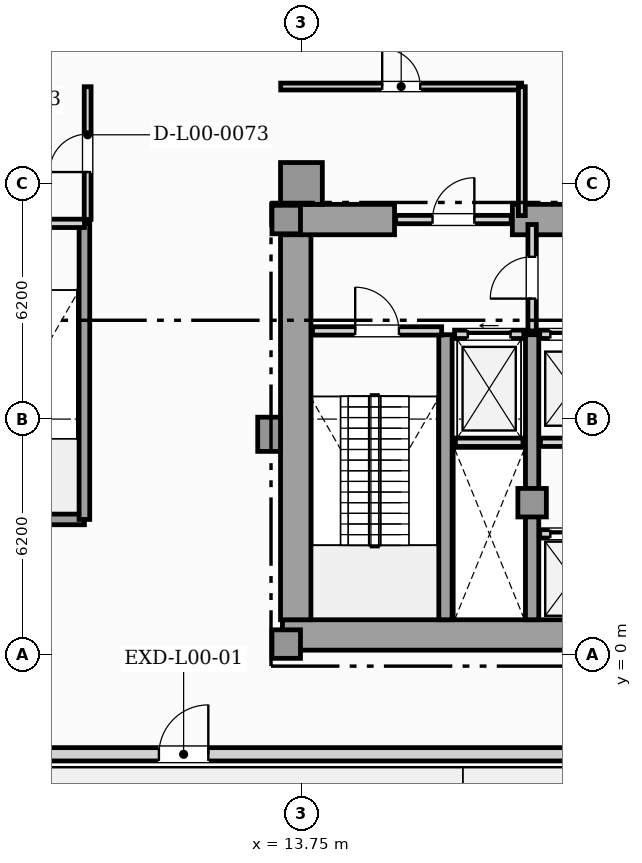
"""IFC4 building model, lengths in metres.
Left out: names, types, materials, properties, quantities, classifications, styles, units other than length and angle.
Written with IfcOpenShell. Run it as: python <this file> out.ifc"""

import sys

from ifc_helpers import new_model, si_unit, direction, frame, frame_2d, origin, origin_2d, place, context, subcontext, project, spatial, rectangle, extrude, element, fill, save


model = new_model("IFC4")
c1 = context("Model", 3, precision=1e-05, world=origin(), true_north=direction((0.0, 1.0)))
c2 = subcontext(c1, "Body", "Model", "MODEL_VIEW")
j1 = project(units=[si_unit("LENGTHUNIT", "METRE"), si_unit("PLANEANGLEUNIT", "RADIAN")], contexts=[c1])
p1 = place(None, origin())
s1 = spatial("IfcSite", under=j1, at=p1, CompositionType="ELEMENT")
p2 = place(p1, origin())
s2 = spatial("IfcBuilding", under=s1, at=p2, CompositionType="ELEMENT")
p3 = place(p2, origin())
s3 = spatial("IfcBuildingStorey", under=s2, at=p3, CompositionType="ELEMENT", Elevation=0.0)
p4 = place(p3, frame((13.25, 0.52, 0.0), z_axis=(0.0, 0.0, 1.0), x_axis=(1.0, 0.0, 0.0)))
e1 = element("IfcWall", 1, at=p4, inside=s3, PredefinedType="SHEAR", context=c2, shape_type="SweptSolid", body=[
    extrude(rectangle(XDim=17.51, YDim=0.8, at=frame_2d((8.755, 0.0))), origin(), (0.0, 0.0, 1.0), 5.1),
])
p5 = place(p3, frame((13.6, 0.92, 0.0), z_axis=(0.0, 0.0, 1.0), x_axis=(0.0, 1.0, 0.0)))
e2 = element("IfcWall", 2, at=p5, inside=s3, PredefinedType="SHEAR", context=c2, shape_type="SweptSolid", body=[
    extrude(rectangle(XDim=10.53, YDim=0.8, at=frame_2d((5.265, 0.0))), origin(), (0.0, 0.0, 1.0), 5.1),
])
p6 = place(p3, frame((13.25, 11.45, 0.0), z_axis=(0.0, 0.0, 1.0), x_axis=(1.0, 0.0, 0.0)))
e3 = element("IfcWall", 3, at=p6, inside=s3, PredefinedType="SHEAR", context=c2, shape_type="SweptSolid", body=[
    extrude(rectangle(XDim=2.95, YDim=0.8, at=frame_2d((1.475, 0.0))), origin(), (0.0, 0.0, 1.0), 5.1),
])
p7 = place(p3, frame((19.3, 11.45, 0.0), z_axis=(0.0, 0.0, 1.0), x_axis=(1.0, 0.0, 0.0)))
e4 = element("IfcWall", 4, at=p7, inside=s3, PredefinedType="SHEAR", context=c2, shape_type="SweptSolid", body=[
    extrude(rectangle(XDim=7.3, YDim=0.8, at=frame_2d((3.65, 0.0))), origin(), (0.0, 0.0, 1.0), 5.1),
])
for number, where, z_axis, x_axis in (
    (5, (17.54, 0.92, 0.0), (0.0, 0.0, 1.0), (0.0, 1.0, 0.0)),
    (6, (19.82, 0.92, 0.0), (0.0, 0.0, 1.0), (0.0, 1.0, 0.0)),
):
    element("IfcWall", number, at=place(p3, frame(where, z_axis=z_axis, x_axis=x_axis)), inside=s3, PredefinedType="SHEAR", context=c2, shape_type="SweptSolid", body=[
        extrude(rectangle(XDim=7.5, YDim=0.35, at=frame_2d((3.75, 0.0))), origin(), (0.0, 0.0, 1.0), 5.1),
    ])
p8 = place(p3, frame((12.9, 5.8, 0.0), z_axis=(0.0, 0.0, 1.0), x_axis=(1.0, 0.0, 0.0)))
e7 = element("IfcColumn", 7, at=p8, inside=s3, PredefinedType="PILASTER", context=c2, shape_type="SweptSolid", body=[
    extrude(rectangle(XDim=0.6, YDim=0.9, at=origin_2d()), origin(), (0.0, 0.0, 1.0), 5.4),
])
for number, where, z_axis, x_axis in (
    (8, (13.35, 0.28, 0.0), (0.0, 0.0, 1.0), (1.0, 0.0, 0.0)),
    (9, (13.35, 11.45, 0.0), (0.0, 0.0, 1.0), (1.0, 0.0, 0.0)),
    (10, (19.82, 4.0, 0.0), (0.0, 0.0, 1.0), (1.0, 0.0, 0.0)),
):
    element("IfcColumn", number, at=place(p3, frame(where, z_axis=z_axis, x_axis=x_axis)), inside=s3, PredefinedType="COLUMN", context=c2, shape_type="SweptSolid", body=[
        extrude(rectangle(XDim=0.75, YDim=0.75, at=origin_2d()), origin(), (0.0, 0.0, 1.0), 5.4),
    ])
p9 = place(p3, frame((13.75, 12.4, 0.0), z_axis=(0.0, 0.0, 1.0), x_axis=(1.0, 0.0, 0.0)))
e11 = element("IfcColumn", 11, at=p9, inside=s3, PredefinedType="COLUMN", context=c2, shape_type="SweptSolid", body=[
    extrude(rectangle(XDim=1.1, YDim=1.1, at=origin_2d()), origin(), (0.0, 0.0, 1.0), 5.4),
])
p10 = place(p3, frame((-8.06, -2.62, 0.0), z_axis=(0.0, 0.0, 1.0), x_axis=(1.0, 0.0, 0.0)))
e12 = element("IfcWall", 12, at=p10, inside=s3, PredefinedType="SOLIDWALL", context=c2, shape_type="SweptSolid", body=[
    extrude(rectangle(XDim=71.97, YDim=0.35, at=frame_2d((35.985, 0.0))), origin(), (0.0, 0.0, 1.0), 5.1),
])
p11 = place(p10, frame((18.06, 0.0, 0.0)))
e13 = element("IfcOpeningElement", 13, at=p11, cuts=e12, PredefinedType="OPENING", context=c2, shape_type="SweptSolid", body=[
    extrude(rectangle(XDim=1.3, YDim=2.2, at=frame_2d((0.65, 1.1))), frame((0.0, 0.185, 0.0), z_axis=(0.0, -1.0, 0.0), x_axis=(1.0, 0.0, 0.0)), (0.0, 0.0, 1.0), 0.37),
])
p12 = place(p10, frame((39.91, 0.0, 0.0)))
e14 = element("IfcOpeningElement", 14, at=p12, cuts=e12, PredefinedType="OPENING", context=c2, shape_type="SweptSolid", body=[
    extrude(rectangle(XDim=1.3, YDim=2.2, at=frame_2d((0.65, 1.1))), frame((0.0, 0.185, 0.0), z_axis=(0.0, -1.0, 0.0), x_axis=(1.0, 0.0, 0.0)), (0.0, 0.0, 1.0), 0.37),
])
p13 = place(p10, frame((54.26, 0.0, 0.0)))
e15 = element("IfcOpeningElement", 15, at=p13, cuts=e12, PredefinedType="OPENING", context=c2, shape_type="SweptSolid", body=[
    extrude(rectangle(XDim=1.3, YDim=2.2, at=frame_2d((0.65, 1.1))), frame((0.0, 0.185, 0.0), z_axis=(0.0, -1.0, 0.0), x_axis=(1.0, 0.0, 0.0)), (0.0, 0.0, 1.0), 0.37),
])
p14 = place(p10, frame((66.76, 0.0, 0.0)))
e16 = element("IfcOpeningElement", 16, at=p14, cuts=e12, PredefinedType="OPENING", context=c2, shape_type="SweptSolid", body=[
    extrude(rectangle(XDim=3.6, YDim=3.2, at=frame_2d((1.8, 1.6))), frame((0.0, 0.185, 0.0), z_axis=(0.0, -1.0, 0.0), x_axis=(1.0, 0.0, 0.0)), (0.0, 0.0, 1.0), 0.37),
])
p15 = place(p10, frame((64.92, 0.0, 0.0)))
e17 = element("IfcOpeningElement", 17, at=p15, cuts=e12, PredefinedType="OPENING", context=c2, shape_type="SweptSolid", body=[
    extrude(rectangle(XDim=1.08, YDim=2.25, at=frame_2d((0.54, 1.125))), frame((0.0, 0.185, 0.0), z_axis=(0.0, -1.0, 0.0), x_axis=(1.0, 0.0, 0.0)), (0.0, 0.0, 1.0), 0.37),
])
p16 = place(p3, frame((17.8, 5.59, 0.0), z_axis=(0.0, 0.0, 1.0), x_axis=(1.0, 0.0, 0.0)))
e18 = element("IfcWall", 18, at=p16, inside=s3, PredefinedType="SOLIDWALL", context=c2, shape_type="SweptSolid", body=[
    extrude(rectangle(XDim=1.78, YDim=0.22, at=frame_2d((0.89, 0.0))), origin(), (0.0, 0.0, 1.0), 5.1),
])
p17 = place(p3, frame((17.78, 8.43, 0.0), z_axis=(0.0, 0.0, 1.0), x_axis=(1.0, 0.0, 0.0)))
e19 = element("IfcWall", 19, at=p17, inside=s3, PredefinedType="SOLIDWALL", context=c2, shape_type="SweptSolid", body=[
    extrude(rectangle(XDim=1.82, YDim=0.22, at=frame_2d((0.91, 0.0))), origin(), (0.0, 0.0, 1.0), 5.1),
])
p18 = place(p17, frame((0.35, 0.0, 0.0)))
e20 = element("IfcOpeningElement", 20, at=p18, cuts=e19, PredefinedType="OPENING", context=c2, shape_type="SweptSolid", body=[
    extrude(rectangle(XDim=1.12, YDim=2.25, at=frame_2d((0.56, 1.125))), frame((0.0, 0.12, 0.0), z_axis=(0.0, -1.0, 0.0), x_axis=(1.0, 0.0, 0.0)), (0.0, 0.0, 1.0), 0.24),
])
p19 = place(p3, frame((20.02, 3.18, 0.0), z_axis=(0.0, 0.0, 1.0), x_axis=(1.0, 0.0, 0.0)))
e21 = element("IfcWall", 21, at=p19, inside=s3, PredefinedType="SOLIDWALL", context=c2, shape_type="SweptSolid", body=[
    extrude(rectangle(XDim=1.74, YDim=0.22, at=frame_2d((0.87, 0.0))), origin(), (0.0, 0.0, 1.0), 5.1),
])
p20 = place(p19, frame((0.28, 0.0, 0.0)))
e22 = element("IfcOpeningElement", 22, at=p20, cuts=e21, PredefinedType="OPENING", context=c2, shape_type="SweptSolid", body=[
    extrude(rectangle(XDim=1.18, YDim=2.2, at=frame_2d((0.59, 1.1))), frame((0.0, 0.12, 0.0), z_axis=(0.0, -1.0, 0.0), x_axis=(1.0, 0.0, 0.0)), (0.0, 0.0, 1.0), 0.24),
])
p21 = place(p3, frame((20.04, 5.59, 0.0), z_axis=(0.0, 0.0, 1.0), x_axis=(1.0, 0.0, 0.0)))
e23 = element("IfcWall", 23, at=p21, inside=s3, PredefinedType="SOLIDWALL", context=c2, shape_type="SweptSolid", body=[
    extrude(rectangle(XDim=1.7, YDim=0.22, at=frame_2d((0.85, 0.0))), origin(), (0.0, 0.0, 1.0), 5.1),
])
p22 = place(p3, frame((20.02, 8.43, 0.0), z_axis=(0.0, 0.0, 1.0), x_axis=(1.0, 0.0, 0.0)))
e24 = element("IfcWall", 24, at=p22, inside=s3, PredefinedType="SOLIDWALL", context=c2, shape_type="SweptSolid", body=[
    extrude(rectangle(XDim=1.74, YDim=0.22, at=frame_2d((0.87, 0.0))), origin(), (0.0, 0.0, 1.0), 5.1),
])
p23 = place(p22, frame((0.28, 0.0, 0.0)))
e25 = element("IfcOpeningElement", 25, at=p23, cuts=e24, PredefinedType="OPENING", context=c2, shape_type="SweptSolid", body=[
    extrude(rectangle(XDim=1.18, YDim=2.2, at=frame_2d((0.59, 1.1))), frame((0.0, 0.12, 0.0), z_axis=(0.0, -1.0, 0.0), x_axis=(1.0, 0.0, 0.0)), (0.0, 0.0, 1.0), 0.24),
])
p24 = place(p3, frame((14.04, 8.52, 0.0), z_axis=(0.0, 0.0, 1.0), x_axis=(1.0, 0.0, 0.0)))
e26 = element("IfcWall", 26, at=p24, inside=s3, PredefinedType="SOLIDWALL", context=c2, shape_type="SweptSolid", body=[
    extrude(rectangle(XDim=3.4, YDim=0.22, at=frame_2d((1.7, 0.0))), origin(), (0.0, 0.0, 1.0), 5.1),
])
p25 = place(p24, frame((1.125, 0.0, 0.0)))
e27 = element("IfcOpeningElement", 27, at=p25, cuts=e26, PredefinedType="OPENING", context=c2, shape_type="SweptSolid", body=[
    extrude(rectangle(XDim=1.15, YDim=2.2, at=frame_2d((0.575, 1.1))), frame((0.0, 0.12, 0.0), z_axis=(0.0, -1.0, 0.0), x_axis=(1.0, 0.0, 0.0)), (0.0, 0.0, 1.0), 0.24),
])
p26 = place(p3, frame((4.36, 3.56, 0.0), z_axis=(0.0, 0.0, 1.0), x_axis=(1.0, 0.0, 0.0)))
e28 = element("IfcWall", 28, at=p26, inside=s3, PredefinedType="SHEAR", context=c2, shape_type="SweptSolid", body=[
    extrude(rectangle(XDim=3.68, YDim=0.28, at=frame_2d((1.84, 0.0))), origin(), (0.0, 0.0, 1.0), 5.1),
])
p27 = place(p3, frame((8.04, 3.56, 0.0), z_axis=(0.0, 0.0, 1.0), x_axis=(0.0, 1.0, 0.0)))
e29 = element("IfcWall", 29, at=p27, inside=s3, PredefinedType="SHEAR", context=c2, shape_type="SweptSolid", body=[
    extrude(rectangle(XDim=7.79, YDim=0.28, at=frame_2d((3.895, 0.0))), origin(), (0.0, 0.0, 1.0), 5.1),
])
p28 = place(p3, frame((4.36, 11.35, 0.0), z_axis=(0.0, 0.0, 1.0), x_axis=(1.0, 0.0, 0.0)))
e30 = element("IfcWall", 30, at=p28, inside=s3, PredefinedType="SOLIDWALL", context=c2, shape_type="SweptSolid", body=[
    extrude(rectangle(XDim=3.68, YDim=0.22, at=frame_2d((1.84, 0.0))), origin(), (0.0, 0.0, 1.0), 5.1),
])
p29 = place(p28, frame((1.265, 0.0, 0.0)))
e31 = element("IfcOpeningElement", 31, at=p29, cuts=e30, PredefinedType="OPENING", context=c2, shape_type="SweptSolid", body=[
    extrude(rectangle(XDim=1.15, YDim=2.2, at=frame_2d((0.575, 1.1))), frame((0.0, 0.12, 0.0), z_axis=(0.0, -1.0, 0.0), x_axis=(1.0, 0.0, 0.0)), (0.0, 0.0, 1.0), 0.24),
])
p30 = place(p3, frame((19.82, 8.52, 0.0), z_axis=(0.0, 0.0, 1.0), x_axis=(0.0, 1.0, 0.0)))
e32 = element("IfcWall", 32, at=p30, inside=s3, PredefinedType="SOLIDWALL", context=c2, shape_type="SweptSolid", body=[
    extrude(rectangle(XDim=2.8, YDim=0.22, at=frame_2d((1.4, 0.0))), origin(), (0.0, 0.0, 1.0), 4.555),
])
p31 = place(p30, frame((0.85, 0.0, 0.0)))
e33 = element("IfcOpeningElement", 33, at=p31, cuts=e32, PredefinedType="OPENING", context=c2, shape_type="SweptSolid", body=[
    extrude(rectangle(XDim=1.1, YDim=2.2, at=frame_2d((0.55, 1.1))), frame((0.0, 0.12, 0.0), z_axis=(0.0, -1.0, 0.0), x_axis=(1.0, 0.0, 0.0)), (0.0, 0.0, 1.0), 0.24),
])
p32 = place(p3, frame((16.23, 11.45, 0.0), z_axis=(0.0, 0.0, 1.0), x_axis=(1.0, 0.0, 0.0)))
e34 = element("IfcWall", 34, at=p32, inside=s3, PredefinedType="SOLIDWALL", context=c2, shape_type="SweptSolid", body=[
    extrude(rectangle(XDim=3.04, YDim=0.22, at=frame_2d((1.52, 0.0))), origin(), (0.0, 0.0, 1.0), 5.1),
])
p33 = place(p32, frame((0.97, 0.0, 0.0)))
e35 = element("IfcOpeningElement", 35, at=p33, cuts=e34, PredefinedType="OPENING", context=c2, shape_type="SweptSolid", body=[
    extrude(rectangle(XDim=1.1, YDim=2.2, at=frame_2d((0.55, 1.1))), frame((0.0, 0.12, 0.0), z_axis=(0.0, -1.0, 0.0), x_axis=(1.0, 0.0, 0.0)), (0.0, 0.0, 1.0), 0.24),
])
p34 = place(p3, frame((13.205, 14.95, 0.0), z_axis=(0.0, 0.0, 1.0), x_axis=(1.0, 0.0, 0.0)))
e36 = element("IfcWall", 36, at=p34, inside=s3, PredefinedType="PARTITIONING", context=c2, shape_type="SweptSolid", body=[
    extrude(rectangle(XDim=6.34, YDim=0.18, at=frame_2d((3.17, 0.0))), origin(), (0.0, 0.0, 1.0), 5.1),
])
p35 = place(p34, frame((2.67, 0.0, 0.0)))
e37 = element("IfcOpeningElement", 37, at=p35, cuts=e36, PredefinedType="OPENING", context=c2, shape_type="SweptSolid", body=[
    extrude(rectangle(XDim=1.0, YDim=2.15, at=frame_2d((0.5, 1.075))), frame((0.0, 0.1, 0.0), z_axis=(0.0, -1.0, 0.0), x_axis=(1.0, 0.0, 0.0)), (0.0, 0.0, 1.0), 0.2),
])
p36 = place(p3, frame((19.55, 11.555, 0.0), z_axis=(0.0, 0.0, 1.0), x_axis=(0.0, 1.0, 0.0)))
e38 = element("IfcWall", 38, at=p36, inside=s3, PredefinedType="PARTITIONING", context=c2, shape_type="SweptSolid", body=[
    extrude(rectangle(XDim=3.39, YDim=0.18, at=frame_2d((1.695, 0.0))), origin(), (0.0, 0.0, 1.0), 5.1),
])
p37 = place(p3, frame((8.125, 11.455, 0.0), z_axis=(0.0, 0.0, 1.0), x_axis=(0.0, 1.0, 0.0)))
e39 = element("IfcWall", 39, at=p37, inside=s3, PredefinedType="PARTITIONING", context=c2, shape_type="SweptSolid", body=[
    extrude(rectangle(XDim=3.49, YDim=0.18, at=frame_2d((1.745, 0.0))), origin(), (0.0, 0.0, 1.0), 5.1),
])
p38 = place(p37, frame((1.245, 0.0, 0.0)))
e40 = element("IfcOpeningElement", 40, at=p38, cuts=e39, PredefinedType="OPENING", context=c2, shape_type="SweptSolid", body=[
    extrude(rectangle(XDim=1.0, YDim=2.15, at=frame_2d((0.5, 1.075))), frame((0.0, 0.1, 0.0), z_axis=(0.0, -1.0, 0.0), x_axis=(1.0, 0.0, 0.0)), (0.0, 0.0, 1.0), 0.2),
])
p39 = place(p11, frame((1.3, 0.0, 0.0), z_axis=(0.0, 0.0, 1.0), x_axis=(-1.0, 0.0, 0.0)))
e41 = element("IfcDoor", 41, at=p39, inside=s3, OperationType="SINGLE_SWING_LEFT", PredefinedType="DOOR", context=c2, shape_type="SweptSolid", body=[
    extrude(rectangle(XDim=1.3, YDim=2.2, at=frame_2d((0.65, 1.1))), frame((0.0, 0.025, 0.0), z_axis=(0.0, -1.0, 0.0), x_axis=(1.0, 0.0, 0.0)), (0.0, 0.0, 1.0), 0.05),
])
fill(e13, e41)
p40 = place(p18, origin())
e42 = element("IfcDoor", 42, at=p40, inside=s3, OperationType="SLIDING_TO_LEFT", PredefinedType="DOOR", context=c2, shape_type="SweptSolid", body=[
    extrude(rectangle(XDim=1.12, YDim=2.25, at=frame_2d((0.56, 1.125))), frame((0.0, 0.025, 0.0), z_axis=(0.0, -1.0, 0.0), x_axis=(1.0, 0.0, 0.0)), (0.0, 0.0, 1.0), 0.05),
])
fill(e20, e42)
p41 = place(p20, origin())
e43 = element("IfcDoor", 43, at=p41, inside=s3, OperationType="SLIDING_TO_RIGHT", PredefinedType="DOOR", context=c2, shape_type="SweptSolid", body=[
    extrude(rectangle(XDim=1.18, YDim=2.2, at=frame_2d((0.59, 1.1))), frame((0.0, 0.025, 0.0), z_axis=(0.0, -1.0, 0.0), x_axis=(1.0, 0.0, 0.0)), (0.0, 0.0, 1.0), 0.05),
])
fill(e22, e43)
p42 = place(p23, origin())
e44 = element("IfcDoor", 44, at=p42, inside=s3, OperationType="SLIDING_TO_RIGHT", PredefinedType="DOOR", context=c2, shape_type="SweptSolid", body=[
    extrude(rectangle(XDim=1.18, YDim=2.2, at=frame_2d((0.59, 1.1))), frame((0.0, 0.025, 0.0), z_axis=(0.0, -1.0, 0.0), x_axis=(1.0, 0.0, 0.0)), (0.0, 0.0, 1.0), 0.05),
])
fill(e25, e44)
p43 = place(p25, origin())
e45 = element("IfcDoor", 45, at=p43, inside=s3, OperationType="SINGLE_SWING_LEFT", PredefinedType="DOOR", context=c2, shape_type="SweptSolid", body=[
    extrude(rectangle(XDim=1.15, YDim=2.2, at=frame_2d((0.575, 1.1))), frame((0.0, 0.025, 0.0), z_axis=(0.0, -1.0, 0.0), x_axis=(1.0, 0.0, 0.0)), (0.0, 0.0, 1.0), 0.05),
])
fill(e27, e45)
p44 = place(p31, origin())
e46 = element("IfcDoor", 46, at=p44, inside=s3, OperationType="SINGLE_SWING_LEFT", PredefinedType="DOOR", context=c2, shape_type="SweptSolid", body=[
    extrude(rectangle(XDim=1.1, YDim=2.2, at=frame_2d((0.55, 1.1))), frame((0.0, 0.025, 0.0), z_axis=(0.0, -1.0, 0.0), x_axis=(1.0, 0.0, 0.0)), (0.0, 0.0, 1.0), 0.05),
])
fill(e33, e46)
p45 = place(p33, origin())
e47 = element("IfcDoor", 47, at=p45, inside=s3, OperationType="SINGLE_SWING_RIGHT", PredefinedType="DOOR", context=c2, shape_type="SweptSolid", body=[
    extrude(rectangle(XDim=1.1, YDim=2.2, at=frame_2d((0.55, 1.1))), frame((0.0, 0.025, 0.0), z_axis=(0.0, -1.0, 0.0), x_axis=(1.0, 0.0, 0.0)), (0.0, 0.0, 1.0), 0.05),
])
fill(e35, e47)
p46 = place(p35, origin())
e48 = element("IfcDoor", 48, at=p46, inside=s3, OperationType="SINGLE_SWING_LEFT", PredefinedType="DOOR", context=c2, shape_type="SweptSolid", body=[
    extrude(rectangle(XDim=1.0, YDim=2.15, at=frame_2d((0.5, 1.075))), frame((0.0, 0.025, 0.0), z_axis=(0.0, -1.0, 0.0), x_axis=(1.0, 0.0, 0.0)), (0.0, 0.0, 1.0), 0.05),
])
fill(e37, e48)
p47 = place(p38, origin())
e49 = element("IfcDoor", 49, at=p47, inside=s3, OperationType="SINGLE_SWING_LEFT", PredefinedType="DOOR", context=c2, shape_type="SweptSolid", body=[
    extrude(rectangle(XDim=1.0, YDim=2.15, at=frame_2d((0.5, 1.075))), frame((0.0, 0.025, 0.0), z_axis=(0.0, -1.0, 0.0), x_axis=(1.0, 0.0, 0.0)), (0.0, 0.0, 1.0), 0.05),
])
fill(e40, e49)
save(model, sys.argv[1])
